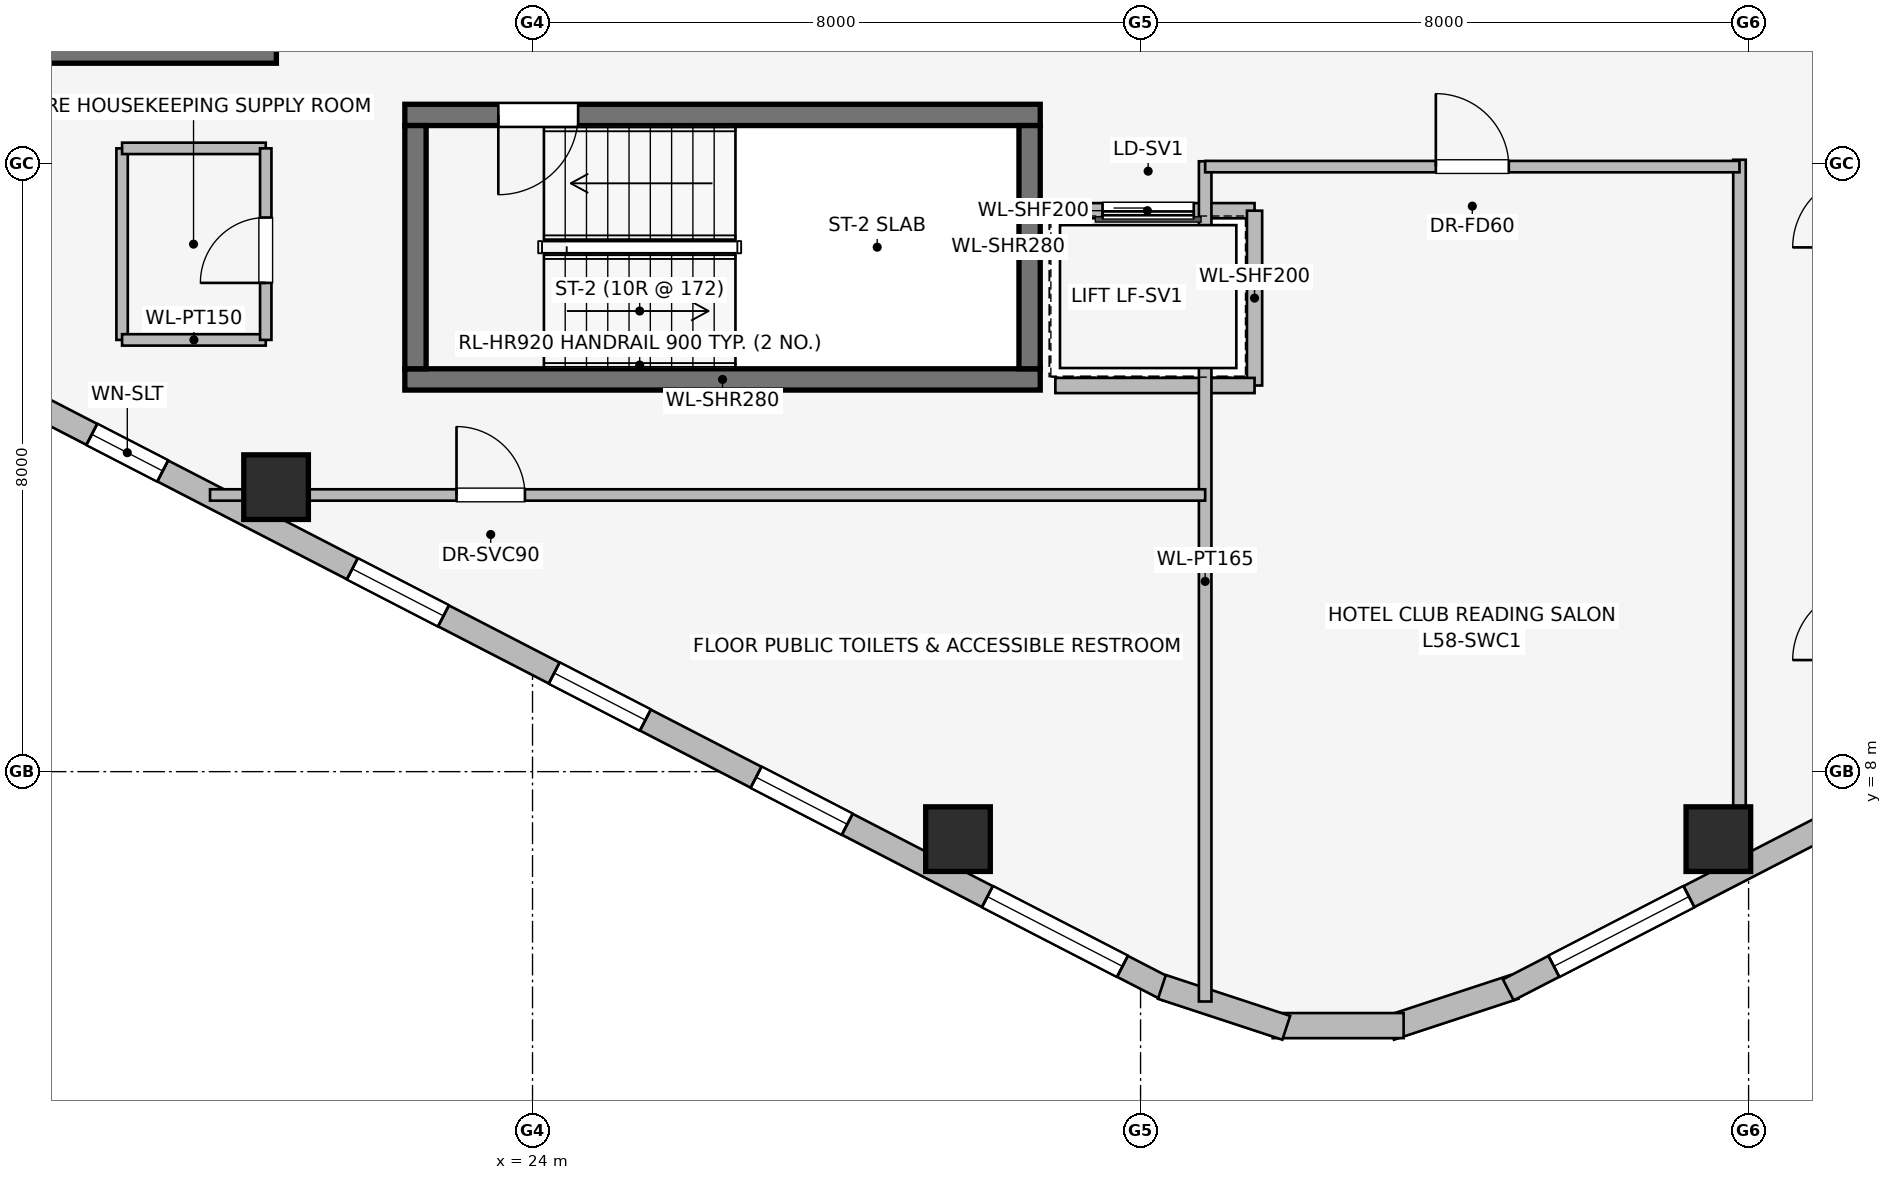
"""IFC4 building model, lengths in metres.
Left out: names, types, materials, properties, quantities, classifications, styles, units other than length and angle.
Written with IfcOpenShell. Run it as: python <this file> out.ifc"""

import sys

from ifc_helpers import new_model, si_unit, direction, frame, frame_2d, origin, origin_2d, place, context, subcontext, project, spatial, rectangle, extrude, element, fill, save


model = new_model("IFC4")
c1 = context("Model", 3, precision=1e-05, world=origin(), true_north=direction((0.0, 1.0)))
c2 = subcontext(c1, "Body", "Model", "MODEL_VIEW")
j1 = project(units=[si_unit("LENGTHUNIT", "METRE"), si_unit("PLANEANGLEUNIT", "RADIAN")], contexts=[c1])
p1 = place(None, origin())
s1 = spatial("IfcSite", under=j1, at=p1, CompositionType="ELEMENT")
p2 = place(p1, origin())
s2 = spatial("IfcBuilding", under=s1, at=p2, CompositionType="ELEMENT")
p3 = place(p2, frame((0.0, 0.0, 213.7)))
s3 = spatial("IfcBuildingStorey", under=s2, at=p3, CompositionType="ELEMENT", Elevation=213.7)
p4 = place(p3, frame((16.87, 17.46, 0.0), z_axis=(0.0, 0.0, 1.0), x_axis=(1.0, 0.0, 0.0)))
e1 = element("IfcWall", 1, at=p4, inside=s3, PredefinedType="SHEAR", context=c2, shape_type="SweptSolid", body=[
    extrude(rectangle(XDim=3.76, YDim=0.28, at=frame_2d((1.88, 0.0))), origin(), (0.0, 0.0, 1.0), 3.45),
])
p5 = place(p3, frame((22.32, 13.16, 0.0), z_axis=(0.0, 0.0, 1.0), x_axis=(1.0, 0.0, 0.0)))
e2 = element("IfcWall", 2, at=p5, inside=s3, PredefinedType="SHEAR", context=c2, shape_type="SweptSolid", body=[
    extrude(rectangle(XDim=8.36, YDim=0.28, at=frame_2d((4.18, 0.0))), origin(), (0.0, 0.0, 1.0), 3.45),
])
p6 = place(p3, frame((30.68, 16.64, 0.0), z_axis=(0.0, 0.0, 1.0), x_axis=(-1.0, 0.0, 0.0)))
e3 = element("IfcWall", 3, at=p6, inside=s3, PredefinedType="SHEAR", context=c2, shape_type="SweptSolid", body=[
    extrude(rectangle(XDim=8.36, YDim=0.28, at=frame_2d((4.18, 0.0))), origin(), (0.0, 0.0, 1.0), 3.45),
])
p7 = place(p6, frame((6.08, 0.0, 0.0)))
e4 = element("IfcOpeningElement", 4, at=p7, cuts=e3, PredefinedType="OPENING", context=c2, shape_type="SweptSolid", body=[
    extrude(rectangle(XDim=1.05, YDim=2.0, at=frame_2d((0.525, 1.0))), frame((0.0, 0.15, 0.0), z_axis=(0.0, -1.0, 0.0), x_axis=(1.0, 0.0, 0.0)), (0.0, 0.0, 1.0), 0.3),
])
for number, where, z_axis, x_axis in (
    (5, (22.46, 16.5, 0.0), (0.0, 0.0, 1.0), (0.0, -1.0, 0.0)),
    (6, (30.54, 13.3, 0.0), (0.0, 0.0, 1.0), (0.0, 1.0, 0.0)),
):
    element("IfcWall", number, at=place(p3, frame(where, z_axis=z_axis, x_axis=x_axis)), inside=s3, PredefinedType="SHEAR", context=c2, shape_type="SweptSolid", body=[
        extrude(rectangle(XDim=3.2, YDim=0.28, at=frame_2d((1.6, 0.0))), origin(), (0.0, 0.0, 1.0), 3.45),
    ])
for number, where, z_axis, x_axis in (
    (7, (20.626, 11.743, 0.0), (0.0, 0.0, 1.0), (1.0, 0.0, 0.0)),
    (8, (29.598, 7.112, 0.0), (0.0, 0.0, 1.0), (1.0, 0.0, 0.0)),
    (9, (39.602, 7.112, 0.0), (0.0, 0.0, 1.0), (1.0, 0.0, 0.0)),
):
    element("IfcColumn", number, at=place(p3, frame(where, z_axis=z_axis, x_axis=x_axis)), inside=s3, PredefinedType="COLUMN", context=c2, shape_type="SweptSolid", body=[
        extrude(rectangle(XDim=0.85, YDim=0.85, at=origin_2d()), origin(), (0.0, 0.0, 1.0), 3.45),
    ])
p8 = place(p3, frame((32.362, 5.129, 0.0), z_axis=(0.0, 0.0, 1.0), x_axis=(-0.888626188278, 0.458632202867, 0.0)))
e10 = element("IfcWall", 10, at=p8, inside=s3, PredefinedType="STANDARD", context=c2, shape_type="SweptSolid", body=[
    extrude(rectangle(XDim=16.828, YDim=0.31, at=frame_2d((8.414, 0.0))), origin(), (0.0, 0.0, 1.0), 3.19),
])
p9 = place(p8, frame((0.675, 0.0, 0.75)))
e11 = element("IfcOpeningElement", 11, at=p9, cuts=e10, PredefinedType="OPENING", context=c2, shape_type="SweptSolid", body=[
    extrude(rectangle(XDim=2.0, YDim=1.5, at=frame_2d((1.0, 0.75))), frame((0.0, 0.165, 0.0), z_axis=(0.0, -1.0, 0.0), x_axis=(1.0, 0.0, 0.0)), (0.0, 0.0, 1.0), 0.33),
])
p10 = place(p8, frame((4.75, 0.0, 0.75)))
e12 = element("IfcOpeningElement", 12, at=p10, cuts=e10, PredefinedType="OPENING", context=c2, shape_type="SweptSolid", body=[
    extrude(rectangle(XDim=1.35, YDim=1.45, at=frame_2d((0.675, 0.725))), frame((0.0, 0.165, 0.0), z_axis=(0.0, -1.0, 0.0), x_axis=(1.0, 0.0, 0.0)), (0.0, 0.0, 1.0), 0.33),
])
p11 = place(p8, frame((7.739, 0.0, 0.75)))
e13 = element("IfcOpeningElement", 13, at=p11, cuts=e10, PredefinedType="OPENING", context=c2, shape_type="SweptSolid", body=[
    extrude(rectangle(XDim=1.35, YDim=1.45, at=frame_2d((0.675, 0.725))), frame((0.0, 0.165, 0.0), z_axis=(0.0, -1.0, 0.0), x_axis=(1.0, 0.0, 0.0)), (0.0, 0.0, 1.0), 0.33),
])
p12 = place(p8, frame((10.728, 0.0, 0.75)))
e14 = element("IfcOpeningElement", 14, at=p12, cuts=e10, PredefinedType="OPENING", context=c2, shape_type="SweptSolid", body=[
    extrude(rectangle(XDim=1.35, YDim=1.45, at=frame_2d((0.675, 0.725))), frame((0.0, 0.165, 0.0), z_axis=(0.0, -1.0, 0.0), x_axis=(1.0, 0.0, 0.0)), (0.0, 0.0, 1.0), 0.33),
])
p13 = place(p8, frame((14.885, 0.0, 0.75)))
e15 = element("IfcOpeningElement", 15, at=p13, cuts=e10, PredefinedType="OPENING", context=c2, shape_type="SweptSolid", body=[
    extrude(rectangle(XDim=1.05, YDim=1.4, at=frame_2d((0.525, 0.7))), frame((0.0, 0.165, 0.0), z_axis=(0.0, -1.0, 0.0), x_axis=(1.0, 0.0, 0.0)), (0.0, 0.0, 1.0), 0.33),
])
p14 = place(p3, frame((36.919, 5.168, 0.0), z_axis=(0.0, 0.0, 1.0), x_axis=(-0.949937416267, -0.312440242569, 0.0)))
e16 = element("IfcWall", 16, at=p14, inside=s3, PredefinedType="STANDARD", context=c2, shape_type="SweptSolid", body=[
    extrude(rectangle(XDim=1.722, YDim=0.33, at=frame_2d((0.861, 0.0))), origin(), (0.0, 0.0, 1.0), 3.19),
])
p15 = place(p3, frame((35.461, 4.659, 0.0), z_axis=(0.0, 0.0, 1.0), x_axis=(-1.0, 0.0, 0.0)))
e17 = element("IfcWall", 17, at=p15, inside=s3, PredefinedType="STANDARD", context=c2, shape_type="SweptSolid", body=[
    extrude(rectangle(XDim=1.722, YDim=0.33, at=frame_2d((0.861, 0.0))), origin(), (0.0, 0.0, 1.0), 3.19),
])
p16 = place(p3, frame((33.917, 4.63, 0.0), z_axis=(0.0, 0.0, 1.0), x_axis=(-0.949937416267, 0.312440242569, 0.0)))
e18 = element("IfcWall", 18, at=p16, inside=s3, PredefinedType="STANDARD", context=c2, shape_type="SweptSolid", body=[
    extrude(rectangle(XDim=1.722, YDim=0.33, at=frame_2d((0.861, 0.0))), origin(), (0.0, 0.0, 1.0), 3.19),
])
p17 = place(p3, frame((51.792, 12.847, 0.0), z_axis=(0.0, 0.0, 1.0), x_axis=(-0.888626188278, -0.458632202867, 0.0)))
e19 = element("IfcWall", 19, at=p17, inside=s3, PredefinedType="STANDARD", context=c2, shape_type="SweptSolid", body=[
    extrude(rectangle(XDim=16.828, YDim=0.31, at=frame_2d((8.414, 0.0))), origin(), (0.0, 0.0, 1.0), 3.19),
])
p18 = place(p17, frame((1.3, 0.0, 0.75)))
e20 = element("IfcOpeningElement", 20, at=p18, cuts=e19, PredefinedType="OPENING", context=c2, shape_type="SweptSolid", body=[
    extrude(rectangle(XDim=1.05, YDim=1.4, at=frame_2d((0.525, 0.7))), frame((0.0, 0.165, 0.0), z_axis=(0.0, -1.0, 0.0), x_axis=(1.0, 0.0, 0.0)), (0.0, 0.0, 1.0), 0.33),
])
p19 = place(p17, frame((4.486, 0.0, 0.75)))
e21 = element("IfcOpeningElement", 21, at=p19, cuts=e19, PredefinedType="OPENING", context=c2, shape_type="SweptSolid", body=[
    extrude(rectangle(XDim=1.35, YDim=1.45, at=frame_2d((0.675, 0.725))), frame((0.0, 0.165, 0.0), z_axis=(0.0, -1.0, 0.0), x_axis=(1.0, 0.0, 0.0)), (0.0, 0.0, 1.0), 0.33),
])
p20 = place(p17, frame((6.946, 0.0, 0.75)))
e22 = element("IfcOpeningElement", 22, at=p20, cuts=e19, PredefinedType="OPENING", context=c2, shape_type="SweptSolid", body=[
    extrude(rectangle(XDim=1.35, YDim=1.45, at=frame_2d((0.675, 0.725))), frame((0.0, 0.165, 0.0), z_axis=(0.0, -1.0, 0.0), x_axis=(1.0, 0.0, 0.0)), (0.0, 0.0, 1.0), 0.33),
])
p21 = place(p17, frame((9.406, 0.0, 0.75)))
e23 = element("IfcOpeningElement", 23, at=p21, cuts=e19, PredefinedType="OPENING", context=c2, shape_type="SweptSolid", body=[
    extrude(rectangle(XDim=1.35, YDim=1.45, at=frame_2d((0.675, 0.725))), frame((0.0, 0.165, 0.0), z_axis=(0.0, -1.0, 0.0), x_axis=(1.0, 0.0, 0.0)), (0.0, 0.0, 1.0), 0.33),
])
p22 = place(p17, frame((14.153, 0.0, 0.75)))
e24 = element("IfcOpeningElement", 24, at=p22, cuts=e19, PredefinedType="OPENING", context=c2, shape_type="SweptSolid", body=[
    extrude(rectangle(XDim=2.0, YDim=1.5, at=frame_2d((1.0, 0.75))), frame((0.0, 0.165, 0.0), z_axis=(0.0, -1.0, 0.0), x_axis=(1.0, 0.0, 0.0)), (0.0, 0.0, 1.0), 0.33),
])
p23 = place(p3, frame((33.5, 15.38, 0.0), z_axis=(0.0, 0.0, 1.0), x_axis=(-1.0, 0.0, 0.0)))
e25 = element("IfcWall", 25, at=p23, inside=s3, PredefinedType="PARTITIONING", context=c2, shape_type="SweptSolid", body=[
    extrude(rectangle(XDim=2.82, YDim=0.2, at=frame_2d((1.41, 0.0))), origin(), (0.0, 0.0, 1.0), 3.19),
])
p24 = place(p23, frame((0.8, 0.0, 0.0)))
e26 = element("IfcOpeningElement", 26, at=p24, cuts=e25, PredefinedType="OPENING", context=c2, shape_type="SweptSolid", body=[
    extrude(rectangle(XDim=1.2, YDim=2.2, at=frame_2d((0.6, 1.1))), frame((0.0, 0.11, 0.0), z_axis=(0.0, -1.0, 0.0), x_axis=(1.0, 0.0, 0.0)), (0.0, 0.0, 1.0), 0.22),
])
p25 = place(p3, frame((33.5, 13.08, 0.0), z_axis=(0.0, 0.0, 1.0), x_axis=(0.0, 1.0, 0.0)))
e27 = element("IfcWall", 27, at=p25, inside=s3, PredefinedType="PARTITIONING", context=c2, shape_type="SweptSolid", body=[
    extrude(rectangle(XDim=2.3, YDim=0.2, at=frame_2d((1.15, 0.0))), origin(), (0.0, 0.0, 1.0), 3.19),
])
p26 = place(p3, frame((30.879, 13.08, 0.0), z_axis=(0.0, 0.0, 1.0), x_axis=(1.0, 0.0, 0.0)))
e28 = element("IfcWall", 28, at=p26, inside=s3, PredefinedType="PARTITIONING", context=c2, shape_type="SweptSolid", body=[
    extrude(rectangle(XDim=2.621, YDim=0.2, at=frame_2d((1.311, 0.0))), origin(), (0.0, 0.0, 1.0), 3.19),
])
p27 = place(p3, frame((18.6, 16.2, 0.0), z_axis=(0.0, 0.0, 1.0), x_axis=(0.0, -1.0, 0.0)))
e29 = element("IfcWall", 29, at=p27, inside=s3, PredefinedType="PARTITIONING", context=c2, shape_type="SweptSolid", body=[
    extrude(rectangle(XDim=2.52, YDim=0.15, at=frame_2d((1.26, 0.0))), origin(), (0.0, 0.0, 1.0), 3.19),
])
for number, where, z_axis, x_axis in (
    (30, (18.6, 13.68, 0.0), (0.0, 0.0, 1.0), (1.0, 0.0, 0.0)),
    (31, (18.6, 16.2, 0.0), (0.0, 0.0, 1.0), (1.0, 0.0, 0.0)),
):
    element("IfcWall", number, at=place(p3, frame(where, z_axis=z_axis, x_axis=x_axis)), inside=s3, PredefinedType="PARTITIONING", context=c2, shape_type="SweptSolid", body=[
        extrude(rectangle(XDim=1.89, YDim=0.15, at=frame_2d((0.945, 0.0))), origin(), (0.0, 0.0, 1.0), 3.19),
    ])
p28 = place(p3, frame((20.49, 13.68, 0.0), z_axis=(0.0, 0.0, 1.0), x_axis=(0.0, 1.0, 0.0)))
e32 = element("IfcWall", 32, at=p28, inside=s3, PredefinedType="PARTITIONING", context=c2, shape_type="SweptSolid", body=[
    extrude(rectangle(XDim=2.52, YDim=0.15, at=frame_2d((1.26, 0.0))), origin(), (0.0, 0.0, 1.0), 3.19),
])
p29 = place(p28, frame((0.75, 0.0, 0.0)))
e33 = element("IfcOpeningElement", 33, at=p29, cuts=e32, PredefinedType="OPENING", context=c2, shape_type="SweptSolid", body=[
    extrude(rectangle(XDim=0.86, YDim=2.0, at=frame_2d((0.43, 1.0))), frame((0.0, 0.085, 0.0), z_axis=(0.0, -1.0, 0.0), x_axis=(1.0, 0.0, 0.0)), (0.0, 0.0, 1.0), 0.17),
])
p30 = place(p3, frame((32.85, 4.976, 0.0), z_axis=(0.0, 0.0, 1.0), x_axis=(0.0, 1.0, 0.0)))
e34 = element("IfcWall", 34, at=p30, inside=s3, PredefinedType="PARTITIONING", context=c2, shape_type="SweptSolid", body=[
    extrude(rectangle(XDim=11.054, YDim=0.165, at=frame_2d((5.527, 0.0))), origin(), (0.0, 0.0, 1.0), 3.19),
])
p31 = place(p3, frame((19.757, 11.64, 0.0), z_axis=(0.0, 0.0, 1.0), x_axis=(1.0, 0.0, 0.0)))
e35 = element("IfcWall", 35, at=p31, inside=s3, PredefinedType="PARTITIONING", context=c2, shape_type="SweptSolid", body=[
    extrude(rectangle(XDim=13.093, YDim=0.15, at=frame_2d((6.546, 0.0))), origin(), (0.0, 0.0, 1.0), 3.19),
])
p32 = place(p31, frame((3.243, 0.0, 0.0)))
e36 = element("IfcOpeningElement", 36, at=p32, cuts=e35, PredefinedType="OPENING", context=c2, shape_type="SweptSolid", body=[
    extrude(rectangle(XDim=0.9, YDim=2.0, at=frame_2d((0.45, 1.0))), frame((0.0, 0.085, 0.0), z_axis=(0.0, -1.0, 0.0), x_axis=(1.0, 0.0, 0.0)), (0.0, 0.0, 1.0), 0.17),
])
p33 = place(p3, frame((39.88, 6.704, 0.0), z_axis=(0.0, 0.0, 1.0), x_axis=(0.0, 1.0, 0.0)))
e37 = element("IfcWall", 37, at=p33, inside=s3, PredefinedType="PARTITIONING", context=c2, shape_type="SweptSolid", body=[
    extrude(rectangle(XDim=9.346, YDim=0.165, at=frame_2d((4.673, 0.0))), origin(), (0.0, 0.0, 1.0), 2.497),
])
p34 = place(p3, frame((32.85, 15.96, 0.0), z_axis=(0.0, 0.0, 1.0), x_axis=(1.0, 0.0, 0.0)))
e38 = element("IfcWall", 38, at=p34, inside=s3, PredefinedType="PARTITIONING", context=c2, shape_type="SweptSolid", body=[
    extrude(rectangle(XDim=7.03, YDim=0.15, at=frame_2d((3.515, 0.0))), origin(), (0.0, 0.0, 1.0), 3.19),
])
p35 = place(p34, frame((3.035, 0.0, 0.0)))
e39 = element("IfcOpeningElement", 39, at=p35, cuts=e38, PredefinedType="OPENING", context=c2, shape_type="SweptSolid", body=[
    extrude(rectangle(XDim=0.96, YDim=2.0, at=frame_2d((0.48, 1.0))), frame((0.0, 0.085, 0.0), z_axis=(0.0, -1.0, 0.0), x_axis=(1.0, 0.0, 0.0)), (0.0, 0.0, 1.0), 0.17),
])
p36 = place(p9, origin())
e40 = element("IfcWindow", 40, at=p36, inside=s3, PartitioningType="SINGLE_PANEL", PredefinedType="WINDOW", context=c2, shape_type="SweptSolid", body=[
    extrude(rectangle(XDim=2.0, YDim=1.5, at=frame_2d((1.0, 0.75))), frame((0.0, 0.03, 0.0), z_axis=(0.0, -1.0, 0.0), x_axis=(1.0, 0.0, 0.0)), (0.0, 0.0, 1.0), 0.06),
])
fill(e11, e40)
p37 = place(p10, origin())
e41 = element("IfcWindow", 41, at=p37, inside=s3, PartitioningType="SINGLE_PANEL", PredefinedType="WINDOW", context=c2, shape_type="SweptSolid", body=[
    extrude(rectangle(XDim=1.35, YDim=1.45, at=frame_2d((0.675, 0.725))), frame((0.0, 0.03, 0.0), z_axis=(0.0, -1.0, 0.0), x_axis=(1.0, 0.0, 0.0)), (0.0, 0.0, 1.0), 0.06),
])
fill(e12, e41)
p38 = place(p11, origin())
e42 = element("IfcWindow", 42, at=p38, inside=s3, PartitioningType="SINGLE_PANEL", PredefinedType="WINDOW", context=c2, shape_type="SweptSolid", body=[
    extrude(rectangle(XDim=1.35, YDim=1.45, at=frame_2d((0.675, 0.725))), frame((0.0, 0.03, 0.0), z_axis=(0.0, -1.0, 0.0), x_axis=(1.0, 0.0, 0.0)), (0.0, 0.0, 1.0), 0.06),
])
fill(e13, e42)
p39 = place(p12, origin())
e43 = element("IfcWindow", 43, at=p39, inside=s3, PartitioningType="SINGLE_PANEL", PredefinedType="WINDOW", context=c2, shape_type="SweptSolid", body=[
    extrude(rectangle(XDim=1.35, YDim=1.45, at=frame_2d((0.675, 0.725))), frame((0.0, 0.03, 0.0), z_axis=(0.0, -1.0, 0.0), x_axis=(1.0, 0.0, 0.0)), (0.0, 0.0, 1.0), 0.06),
])
fill(e14, e43)
p40 = place(p13, origin())
e44 = element("IfcWindow", 44, at=p40, inside=s3, PartitioningType="SINGLE_PANEL", PredefinedType="WINDOW", context=c2, shape_type="SweptSolid", body=[
    extrude(rectangle(XDim=1.05, YDim=1.4, at=frame_2d((0.525, 0.7))), frame((0.0, 0.03, 0.0), z_axis=(0.0, -1.0, 0.0), x_axis=(1.0, 0.0, 0.0)), (0.0, 0.0, 1.0), 0.06),
])
fill(e15, e44)
p41 = place(p22, origin())
e45 = element("IfcWindow", 45, at=p41, inside=s3, PartitioningType="SINGLE_PANEL", PredefinedType="WINDOW", context=c2, shape_type="SweptSolid", body=[
    extrude(rectangle(XDim=2.0, YDim=1.5, at=frame_2d((1.0, 0.75))), frame((0.0, 0.03, 0.0), z_axis=(0.0, -1.0, 0.0), x_axis=(1.0, 0.0, 0.0)), (0.0, 0.0, 1.0), 0.06),
])
fill(e24, e45)
p42 = place(p7, origin())
e46 = element("IfcDoor", 46, at=p42, inside=s3, OperationType="SINGLE_SWING_RIGHT", PredefinedType="DOOR", context=c2, shape_type="SweptSolid", body=[
    extrude(rectangle(XDim=1.05, YDim=2.0, at=frame_2d((0.525, 1.0))), frame((0.0, 0.025, 0.0), z_axis=(0.0, -1.0, 0.0), x_axis=(1.0, 0.0, 0.0)), (0.0, 0.0, 1.0), 0.05),
])
fill(e4, e46)
p43 = place(p24, origin())
e47 = element("IfcDoor", 47, at=p43, inside=s3, OperationType="SLIDING_TO_RIGHT", PredefinedType="DOOR", context=c2, shape_type="SweptSolid", body=[
    extrude(rectangle(XDim=1.2, YDim=2.2, at=frame_2d((0.6, 1.1))), frame((0.0, 0.025, 0.0), z_axis=(0.0, -1.0, 0.0), x_axis=(1.0, 0.0, 0.0)), (0.0, 0.0, 1.0), 0.05),
])
fill(e26, e47)
p44 = place(p29, origin())
e48 = element("IfcDoor", 48, at=p44, inside=s3, OperationType="SINGLE_SWING_LEFT", PredefinedType="DOOR", context=c2, shape_type="SweptSolid", body=[
    extrude(rectangle(XDim=0.86, YDim=2.0, at=frame_2d((0.43, 1.0))), frame((0.0, 0.025, 0.0), z_axis=(0.0, -1.0, 0.0), x_axis=(1.0, 0.0, 0.0)), (0.0, 0.0, 1.0), 0.05),
])
fill(e33, e48)
p45 = place(p32, origin())
e49 = element("IfcDoor", 49, at=p45, inside=s3, OperationType="SINGLE_SWING_LEFT", PredefinedType="DOOR", context=c2, shape_type="SweptSolid", body=[
    extrude(rectangle(XDim=0.9, YDim=2.0, at=frame_2d((0.45, 1.0))), frame((0.0, 0.025, 0.0), z_axis=(0.0, -1.0, 0.0), x_axis=(1.0, 0.0, 0.0)), (0.0, 0.0, 1.0), 0.05),
])
fill(e36, e49)
p46 = place(p35, origin())
e50 = element("IfcDoor", 50, at=p46, inside=s3, OperationType="SINGLE_SWING_LEFT", PredefinedType="DOOR", context=c2, shape_type="SweptSolid", body=[
    extrude(rectangle(XDim=0.96, YDim=2.0, at=frame_2d((0.48, 1.0))), frame((0.0, 0.025, 0.0), z_axis=(0.0, -1.0, 0.0), x_axis=(1.0, 0.0, 0.0)), (0.0, 0.0, 1.0), 0.05),
])
fill(e39, e50)
save(model, sys.argv[1])
